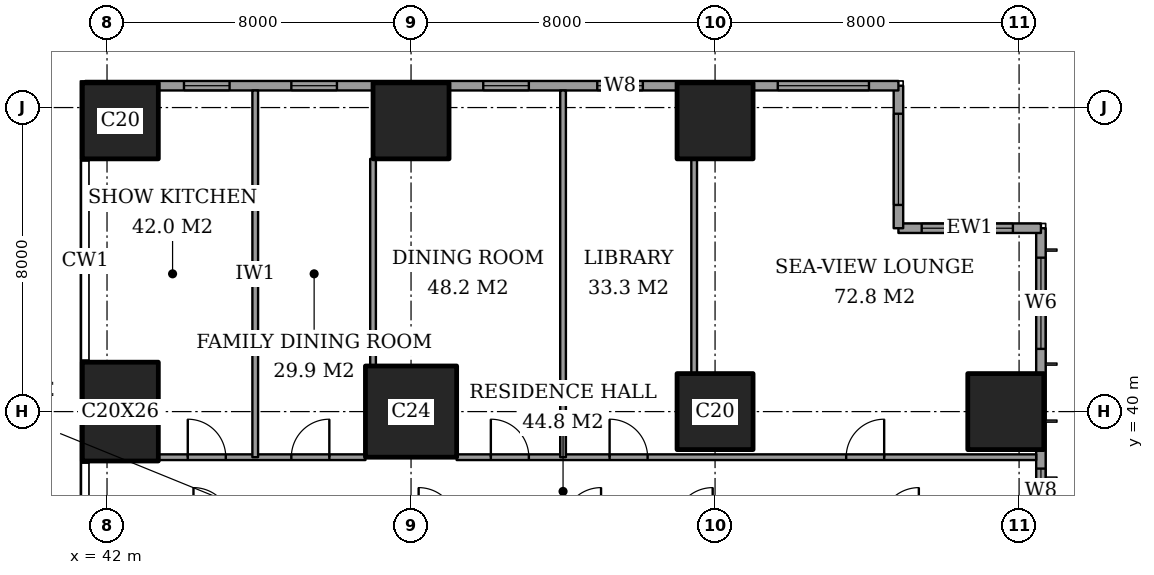
"""IFC4 building model, lengths in metres.
Left out: names, types, materials, properties, quantities, classifications, styles, units other than length and angle.
Written with IfcOpenShell. Run it as: python <this file> out.ifc"""

import sys

from ifc_helpers import new_model, si_unit, direction, frame, frame_2d, origin, origin_2d, place, context, subcontext, project, spatial, rectangle, extrude, element, fill, save


model = new_model("IFC4")
c1 = context("Model", 3, precision=1e-05, world=origin(), true_north=direction((0.0, 1.0)))
c2 = subcontext(c1, "Body", "Model", "MODEL_VIEW")
j1 = project(units=[si_unit("LENGTHUNIT", "METRE"), si_unit("PLANEANGLEUNIT", "RADIAN")], contexts=[c1])
p1 = place(None, origin())
s1 = spatial("IfcSite", under=j1, at=p1, CompositionType="ELEMENT")
p2 = place(p1, origin())
s2 = spatial("IfcBuilding", under=s1, at=p2, CompositionType="ELEMENT")
p3 = place(p2, frame((0.0, 0.0, 47.6)))
s3 = spatial("IfcBuildingStorey", under=s2, at=p3, CompositionType="ELEMENT", Elevation=47.6)
p4 = place(p3, frame((42.35, 40.0, 0.0), z_axis=(0.0, 0.0, 1.0), x_axis=(1.0, 0.0, 0.0)))
e1 = element("IfcColumn", 1, at=p4, inside=s3, PredefinedType="COLUMN", context=c2, shape_type="SweptSolid", body=[
    extrude(rectangle(XDim=2.0, YDim=2.6, at=origin_2d()), origin(), (0.0, 0.0, 1.0), 3.6),
])
p5 = place(p3, frame((42.35, 47.65, 0.0), z_axis=(0.0, 0.0, 1.0), x_axis=(1.0, 0.0, 0.0)))
e2 = element("IfcColumn", 2, at=p5, inside=s3, PredefinedType="COLUMN", context=c2, shape_type="SweptSolid", body=[
    extrude(rectangle(XDim=2.0, YDim=2.0, at=origin_2d()), origin(), (0.0, 0.0, 1.0), 3.6),
])
p6 = place(p3, frame((50.0, 40.0, 0.0), z_axis=(0.0, 0.0, 1.0), x_axis=(1.0, 0.0, 0.0)))
e3 = element("IfcColumn", 3, at=p6, inside=s3, PredefinedType="COLUMN", context=c2, shape_type="SweptSolid", body=[
    extrude(rectangle(XDim=2.4, YDim=2.4, at=origin_2d()), origin(), (0.0, 0.0, 1.0), 3.6),
])
for number, where, z_axis, x_axis in (
    (4, (50.0, 47.65, 0.0), (0.0, 0.0, 1.0), (1.0, 0.0, 0.0)),
    (5, (58.0, 40.0, 0.0), (0.0, 0.0, 1.0), (1.0, 0.0, 0.0)),
    (6, (58.0, 47.65, 0.0), (0.0, 0.0, 1.0), (1.0, 0.0, 0.0)),
    (7, (65.65, 40.0, 0.0), (0.0, 0.0, 1.0), (1.0, 0.0, 0.0)),
):
    element("IfcColumn", number, at=place(p3, frame(where, z_axis=z_axis, x_axis=x_axis)), inside=s3, PredefinedType="COLUMN", context=c2, shape_type="SweptSolid", body=[
        extrude(rectangle(XDim=2.0, YDim=2.0, at=origin_2d()), origin(), (0.0, 0.0, 1.0), 3.6),
    ])
p7 = place(p3, frame((66.575, 3.175, 0.0), z_axis=(0.0, 0.0, 1.0), x_axis=(0.0, 1.0, 0.0)))
e8 = element("IfcWall", 8, at=p7, inside=s3, PredefinedType="SOLIDWALL", context=c2, shape_type="SweptSolid", body=[
    extrude(rectangle(XDim=41.65, YDim=0.25, at=frame_2d((20.825, 0.0))), origin(), (0.0, 0.0, 1.0), 3.6),
])
p8 = place(p7, frame((0.775, 0.0, 0.6)))
e9 = element("IfcOpeningElement", 9, at=p8, cuts=e8, PredefinedType="OPENING", context=c2, shape_type="SweptSolid", body=[
    extrude(rectangle(XDim=2.4, YDim=2.0, at=frame_2d((1.2, 1.0))), frame((0.0, 0.135, 0.0), z_axis=(0.0, -1.0, 0.0), x_axis=(1.0, 0.0, 0.0)), (0.0, 0.0, 1.0), 0.27),
])
p9 = place(p7, frame((6.125, 0.0, 0.6)))
e10 = element("IfcOpeningElement", 10, at=p9, cuts=e8, PredefinedType="OPENING", context=c2, shape_type="SweptSolid", body=[
    extrude(rectangle(XDim=1.2, YDim=2.0, at=frame_2d((0.6, 1.0))), frame((0.0, 0.135, 0.0), z_axis=(0.0, -1.0, 0.0), x_axis=(1.0, 0.0, 0.0)), (0.0, 0.0, 1.0), 0.27),
])
p10 = place(p7, frame((8.375, 0.0, 0.6)))
e11 = element("IfcOpeningElement", 11, at=p10, cuts=e8, PredefinedType="OPENING", context=c2, shape_type="SweptSolid", body=[
    extrude(rectangle(XDim=2.4, YDim=2.0, at=frame_2d((1.2, 1.0))), frame((0.0, 0.135, 0.0), z_axis=(0.0, -1.0, 0.0), x_axis=(1.0, 0.0, 0.0)), (0.0, 0.0, 1.0), 0.27),
])
p11 = place(p7, frame((15.775, 0.0, 0.6)))
e12 = element("IfcOpeningElement", 12, at=p11, cuts=e8, PredefinedType="OPENING", context=c2, shape_type="SweptSolid", body=[
    extrude(rectangle(XDim=2.4, YDim=2.0, at=frame_2d((1.2, 1.0))), frame((0.0, 0.135, 0.0), z_axis=(0.0, -1.0, 0.0), x_axis=(1.0, 0.0, 0.0)), (0.0, 0.0, 1.0), 0.27),
])
p12 = place(p7, frame((23.475, 0.0, 0.6)))
e13 = element("IfcOpeningElement", 13, at=p12, cuts=e8, PredefinedType="OPENING", context=c2, shape_type="SweptSolid", body=[
    extrude(rectangle(XDim=2.4, YDim=2.0, at=frame_2d((1.2, 1.0))), frame((0.0, 0.135, 0.0), z_axis=(0.0, -1.0, 0.0), x_axis=(1.0, 0.0, 0.0)), (0.0, 0.0, 1.0), 0.27),
])
p13 = place(p7, frame((30.775, 0.0, 0.6)))
e14 = element("IfcOpeningElement", 14, at=p13, cuts=e8, PredefinedType="OPENING", context=c2, shape_type="SweptSolid", body=[
    extrude(rectangle(XDim=2.4, YDim=2.0, at=frame_2d((1.2, 1.0))), frame((0.0, 0.135, 0.0), z_axis=(0.0, -1.0, 0.0), x_axis=(1.0, 0.0, 0.0)), (0.0, 0.0, 1.0), 0.27),
])
p14 = place(p7, frame((34.125, 0.0, 0.6)))
e15 = element("IfcOpeningElement", 15, at=p14, cuts=e8, PredefinedType="OPENING", context=c2, shape_type="SweptSolid", body=[
    extrude(rectangle(XDim=1.2, YDim=2.0, at=frame_2d((0.6, 1.0))), frame((0.0, 0.135, 0.0), z_axis=(0.0, -1.0, 0.0), x_axis=(1.0, 0.0, 0.0)), (0.0, 0.0, 1.0), 0.27),
])
p15 = place(p7, frame((38.475, 0.0, 0.6)))
e16 = element("IfcOpeningElement", 16, at=p15, cuts=e8, PredefinedType="OPENING", context=c2, shape_type="SweptSolid", body=[
    extrude(rectangle(XDim=2.4, YDim=2.0, at=frame_2d((1.2, 1.0))), frame((0.0, 0.135, 0.0), z_axis=(0.0, -1.0, 0.0), x_axis=(1.0, 0.0, 0.0)), (0.0, 0.0, 1.0), 0.27),
])
p16 = place(p3, frame((66.575, 44.825, 0.0), z_axis=(0.0, 0.0, 1.0), x_axis=(-1.0, 0.0, 0.0)))
e17 = element("IfcWall", 17, at=p16, inside=s3, PredefinedType="SOLIDWALL", context=c2, shape_type="SweptSolid", body=[
    extrude(rectangle(XDim=3.75, YDim=0.25, at=frame_2d((1.875, 0.0))), origin(), (0.0, 0.0, 1.0), 3.6),
])
p17 = place(p16, frame((0.738, 0.0, 0.6)))
e18 = element("IfcOpeningElement", 18, at=p17, cuts=e17, PredefinedType="OPENING", context=c2, shape_type="SweptSolid", body=[
    extrude(rectangle(XDim=2.4, YDim=2.0, at=frame_2d((1.2, 1.0))), frame((0.0, 0.135, 0.0), z_axis=(0.0, -1.0, 0.0), x_axis=(1.0, 0.0, 0.0)), (0.0, 0.0, 1.0), 0.27),
])
p18 = place(p3, frame((62.825, 44.825, 0.0), z_axis=(0.0, 0.0, 1.0), x_axis=(0.0, 1.0, 0.0)))
e19 = element("IfcWall", 19, at=p18, inside=s3, PredefinedType="SOLIDWALL", context=c2, shape_type="SweptSolid", body=[
    extrude(rectangle(XDim=3.75, YDim=0.25, at=frame_2d((1.875, 0.0))), origin(), (0.0, 0.0, 1.0), 3.6),
])
p19 = place(p18, frame((0.613, 0.0, 0.6)))
e20 = element("IfcOpeningElement", 20, at=p19, cuts=e19, PredefinedType="OPENING", context=c2, shape_type="SweptSolid", body=[
    extrude(rectangle(XDim=2.4, YDim=2.0, at=frame_2d((1.2, 1.0))), frame((0.0, 0.135, 0.0), z_axis=(0.0, -1.0, 0.0), x_axis=(1.0, 0.0, 0.0)), (0.0, 0.0, 1.0), 0.27),
])
p20 = place(p3, frame((62.825, 48.575, 0.0), z_axis=(0.0, 0.0, 1.0), x_axis=(-1.0, 0.0, 0.0)))
e21 = element("IfcWall", 21, at=p20, inside=s3, PredefinedType="SOLIDWALL", context=c2, shape_type="SweptSolid", body=[
    extrude(rectangle(XDim=21.4, YDim=0.25, at=frame_2d((10.7, 0.0))), origin(), (0.0, 0.0, 1.0), 3.6),
])
p21 = place(p20, frame((0.775, 0.0, 0.6)))
e22 = element("IfcOpeningElement", 22, at=p21, cuts=e21, PredefinedType="OPENING", context=c2, shape_type="SweptSolid", body=[
    extrude(rectangle(XDim=2.4, YDim=2.0, at=frame_2d((1.2, 1.0))), frame((0.0, 0.135, 0.0), z_axis=(0.0, -1.0, 0.0), x_axis=(1.0, 0.0, 0.0)), (0.0, 0.0, 1.0), 0.27),
])
p22 = place(p20, frame((6.725, 0.0, 0.6)))
e23 = element("IfcOpeningElement", 23, at=p22, cuts=e21, PredefinedType="OPENING", context=c2, shape_type="SweptSolid", body=[
    extrude(rectangle(XDim=1.2, YDim=2.0, at=frame_2d((0.6, 1.0))), frame((0.0, 0.135, 0.0), z_axis=(0.0, -1.0, 0.0), x_axis=(1.0, 0.0, 0.0)), (0.0, 0.0, 1.0), 0.27),
])
p23 = place(p20, frame((9.725, 0.0, 0.6)))
e24 = element("IfcOpeningElement", 24, at=p23, cuts=e21, PredefinedType="OPENING", context=c2, shape_type="SweptSolid", body=[
    extrude(rectangle(XDim=1.2, YDim=2.0, at=frame_2d((0.6, 1.0))), frame((0.0, 0.135, 0.0), z_axis=(0.0, -1.0, 0.0), x_axis=(1.0, 0.0, 0.0)), (0.0, 0.0, 1.0), 0.27),
])
p24 = place(p20, frame((14.775, 0.0, 0.6)))
e25 = element("IfcOpeningElement", 25, at=p24, cuts=e21, PredefinedType="OPENING", context=c2, shape_type="SweptSolid", body=[
    extrude(rectangle(XDim=1.2, YDim=2.0, at=frame_2d((0.6, 1.0))), frame((0.0, 0.135, 0.0), z_axis=(0.0, -1.0, 0.0), x_axis=(1.0, 0.0, 0.0)), (0.0, 0.0, 1.0), 0.27),
])
p25 = place(p20, frame((17.6, 0.0, 0.6)))
e26 = element("IfcOpeningElement", 26, at=p25, cuts=e21, PredefinedType="OPENING", context=c2, shape_type="SweptSolid", body=[
    extrude(rectangle(XDim=1.2, YDim=2.0, at=frame_2d((0.6, 1.0))), frame((0.0, 0.135, 0.0), z_axis=(0.0, -1.0, 0.0), x_axis=(1.0, 0.0, 0.0)), (0.0, 0.0, 1.0), 0.27),
])
p26 = place(p3, frame((43.35, 38.8, 0.0), z_axis=(0.0, 0.0, 1.0), x_axis=(1.0, 0.0, 0.0)))
e27 = element("IfcWall", 27, at=p26, inside=s3, PredefinedType="PARTITIONING", context=c2, shape_type="SweptSolid", body=[
    extrude(rectangle(XDim=5.45, YDim=0.15, at=frame_2d((2.725, 0.0))), origin(), (0.0, 0.0, 1.0), 3.35),
])
p27 = place(p26, frame((3.5, 0.0, 0.0)))
e28 = element("IfcOpeningElement", 28, at=p27, cuts=e27, PredefinedType="OPENING", context=c2, shape_type="SweptSolid", body=[
    extrude(rectangle(XDim=1.0, YDim=2.1, at=frame_2d((0.5, 1.05))), frame((0.0, 0.085, 0.0), z_axis=(0.0, -1.0, 0.0), x_axis=(1.0, 0.0, 0.0)), (0.0, 0.0, 1.0), 0.17),
])
p28 = place(p26, frame((0.775, 0.0, 0.0)))
e29 = element("IfcOpeningElement", 29, at=p28, cuts=e27, PredefinedType="OPENING", context=c2, shape_type="SweptSolid", body=[
    extrude(rectangle(XDim=1.0, YDim=2.1, at=frame_2d((0.5, 1.05))), frame((0.0, 0.085, 0.0), z_axis=(0.0, -1.0, 0.0), x_axis=(1.0, 0.0, 0.0)), (0.0, 0.0, 1.0), 0.17),
])
p29 = place(p3, frame((51.2, 38.8, 0.0), z_axis=(0.0, 0.0, 1.0), x_axis=(1.0, 0.0, 0.0)))
e30 = element("IfcWall", 30, at=p29, inside=s3, PredefinedType="PARTITIONING", context=c2, shape_type="SweptSolid", body=[
    extrude(rectangle(XDim=15.25, YDim=0.15, at=frame_2d((7.625, 0.0))), origin(), (0.0, 0.0, 1.0), 3.35),
])
p30 = place(p29, frame((10.25, 0.0, 0.0)))
e31 = element("IfcOpeningElement", 31, at=p30, cuts=e30, PredefinedType="OPENING", context=c2, shape_type="SweptSolid", body=[
    extrude(rectangle(XDim=1.0, YDim=2.1, at=frame_2d((0.5, 1.05))), frame((0.0, 0.085, 0.0), z_axis=(0.0, -1.0, 0.0), x_axis=(1.0, 0.0, 0.0)), (0.0, 0.0, 1.0), 0.17),
])
p31 = place(p29, frame((4.025, 0.0, 0.0)))
e32 = element("IfcOpeningElement", 32, at=p31, cuts=e30, PredefinedType="OPENING", context=c2, shape_type="SweptSolid", body=[
    extrude(rectangle(XDim=1.0, YDim=2.1, at=frame_2d((0.5, 1.05))), frame((0.0, 0.085, 0.0), z_axis=(0.0, -1.0, 0.0), x_axis=(1.0, 0.0, 0.0)), (0.0, 0.0, 1.0), 0.17),
])
p32 = place(p29, frame((0.9, 0.0, 0.0)))
e33 = element("IfcOpeningElement", 33, at=p32, cuts=e30, PredefinedType="OPENING", context=c2, shape_type="SweptSolid", body=[
    extrude(rectangle(XDim=1.0, YDim=2.1, at=frame_2d((0.5, 1.05))), frame((0.0, 0.085, 0.0), z_axis=(0.0, -1.0, 0.0), x_axis=(1.0, 0.0, 0.0)), (0.0, 0.0, 1.0), 0.17),
])
p33 = place(p3, frame((45.9, 38.8, 0.0), z_axis=(0.0, 0.0, 1.0), x_axis=(0.0, 1.0, 0.0)))
e34 = element("IfcWall", 34, at=p33, inside=s3, PredefinedType="PARTITIONING", context=c2, shape_type="SweptSolid", body=[
    extrude(rectangle(XDim=9.65, YDim=0.15, at=frame_2d((4.825, 0.0))), origin(), (0.0, 0.0, 1.0), 3.35),
])
p34 = place(p3, frame((49.0, 41.2, 0.0), z_axis=(0.0, 0.0, 1.0), x_axis=(0.0, 1.0, 0.0)))
e35 = element("IfcWall", 35, at=p34, inside=s3, PredefinedType="PARTITIONING", context=c2, shape_type="SweptSolid", body=[
    extrude(rectangle(XDim=5.45, YDim=0.15, at=frame_2d((2.725, 0.0))), origin(), (0.0, 0.0, 1.0), 3.35),
])
p35 = place(p3, frame((54.0, 38.8, 0.0), z_axis=(0.0, 0.0, 1.0), x_axis=(0.0, 1.0, 0.0)))
e36 = element("IfcWall", 36, at=p35, inside=s3, PredefinedType="PARTITIONING", context=c2, shape_type="SweptSolid", body=[
    extrude(rectangle(XDim=9.65, YDim=0.15, at=frame_2d((4.825, 0.0))), origin(), (0.0, 0.0, 1.0), 3.35),
])
p36 = place(p3, frame((57.45, 41.0, 0.0), z_axis=(0.0, 0.0, 1.0), x_axis=(0.0, 1.0, 0.0)))
e37 = element("IfcWall", 37, at=p36, inside=s3, PredefinedType="PARTITIONING", context=c2, shape_type="SweptSolid", body=[
    extrude(rectangle(XDim=5.65, YDim=0.15, at=frame_2d((2.825, 0.0))), origin(), (0.0, 0.0, 1.0), 3.35),
])
p37 = place(p14, origin())
e38 = element("IfcWindow", 38, at=p37, inside=s3, PartitioningType="SINGLE_PANEL", PredefinedType="WINDOW", context=c2, shape_type="SweptSolid", body=[
    extrude(rectangle(XDim=1.2, YDim=2.0, at=frame_2d((0.6, 1.0))), frame((0.0, 0.03, 0.0), z_axis=(0.0, -1.0, 0.0), x_axis=(1.0, 0.0, 0.0)), (0.0, 0.0, 1.0), 0.06),
])
fill(e15, e38)
p38 = place(p15, origin())
e39 = element("IfcWindow", 39, at=p38, inside=s3, PartitioningType="SINGLE_PANEL", PredefinedType="WINDOW", context=c2, shape_type="SweptSolid", body=[
    extrude(rectangle(XDim=2.4, YDim=2.0, at=frame_2d((1.2, 1.0))), frame((0.0, 0.03, 0.0), z_axis=(0.0, -1.0, 0.0), x_axis=(1.0, 0.0, 0.0)), (0.0, 0.0, 1.0), 0.06),
])
fill(e16, e39)
p39 = place(p17, origin())
e40 = element("IfcWindow", 40, at=p39, inside=s3, PartitioningType="SINGLE_PANEL", PredefinedType="WINDOW", context=c2, shape_type="SweptSolid", body=[
    extrude(rectangle(XDim=2.4, YDim=2.0, at=frame_2d((1.2, 1.0))), frame((0.0, 0.03, 0.0), z_axis=(0.0, -1.0, 0.0), x_axis=(1.0, 0.0, 0.0)), (0.0, 0.0, 1.0), 0.06),
])
fill(e18, e40)
p40 = place(p19, origin())
e41 = element("IfcWindow", 41, at=p40, inside=s3, PartitioningType="SINGLE_PANEL", PredefinedType="WINDOW", context=c2, shape_type="SweptSolid", body=[
    extrude(rectangle(XDim=2.4, YDim=2.0, at=frame_2d((1.2, 1.0))), frame((0.0, 0.03, 0.0), z_axis=(0.0, -1.0, 0.0), x_axis=(1.0, 0.0, 0.0)), (0.0, 0.0, 1.0), 0.06),
])
fill(e20, e41)
p41 = place(p21, origin())
e42 = element("IfcWindow", 42, at=p41, inside=s3, PartitioningType="SINGLE_PANEL", PredefinedType="WINDOW", context=c2, shape_type="SweptSolid", body=[
    extrude(rectangle(XDim=2.4, YDim=2.0, at=frame_2d((1.2, 1.0))), frame((0.0, 0.03, 0.0), z_axis=(0.0, -1.0, 0.0), x_axis=(1.0, 0.0, 0.0)), (0.0, 0.0, 1.0), 0.06),
])
fill(e22, e42)
p42 = place(p22, origin())
e43 = element("IfcWindow", 43, at=p42, inside=s3, PartitioningType="SINGLE_PANEL", PredefinedType="WINDOW", context=c2, shape_type="SweptSolid", body=[
    extrude(rectangle(XDim=1.2, YDim=2.0, at=frame_2d((0.6, 1.0))), frame((0.0, 0.03, 0.0), z_axis=(0.0, -1.0, 0.0), x_axis=(1.0, 0.0, 0.0)), (0.0, 0.0, 1.0), 0.06),
])
fill(e23, e43)
p43 = place(p23, origin())
e44 = element("IfcWindow", 44, at=p43, inside=s3, PartitioningType="SINGLE_PANEL", PredefinedType="WINDOW", context=c2, shape_type="SweptSolid", body=[
    extrude(rectangle(XDim=1.2, YDim=2.0, at=frame_2d((0.6, 1.0))), frame((0.0, 0.03, 0.0), z_axis=(0.0, -1.0, 0.0), x_axis=(1.0, 0.0, 0.0)), (0.0, 0.0, 1.0), 0.06),
])
fill(e24, e44)
p44 = place(p24, origin())
e45 = element("IfcWindow", 45, at=p44, inside=s3, PartitioningType="SINGLE_PANEL", PredefinedType="WINDOW", context=c2, shape_type="SweptSolid", body=[
    extrude(rectangle(XDim=1.2, YDim=2.0, at=frame_2d((0.6, 1.0))), frame((0.0, 0.03, 0.0), z_axis=(0.0, -1.0, 0.0), x_axis=(1.0, 0.0, 0.0)), (0.0, 0.0, 1.0), 0.06),
])
fill(e25, e45)
p45 = place(p25, origin())
e46 = element("IfcWindow", 46, at=p45, inside=s3, PartitioningType="SINGLE_PANEL", PredefinedType="WINDOW", context=c2, shape_type="SweptSolid", body=[
    extrude(rectangle(XDim=1.2, YDim=2.0, at=frame_2d((0.6, 1.0))), frame((0.0, 0.03, 0.0), z_axis=(0.0, -1.0, 0.0), x_axis=(1.0, 0.0, 0.0)), (0.0, 0.0, 1.0), 0.06),
])
fill(e26, e46)
p46 = place(p30, origin())
e47 = element("IfcDoor", 47, at=p46, inside=s3, OperationType="SINGLE_SWING_LEFT", PredefinedType="DOOR", context=c2, shape_type="SweptSolid", body=[
    extrude(rectangle(XDim=1.0, YDim=2.1, at=frame_2d((0.5, 1.05))), frame((0.0, 0.025, 0.0), z_axis=(0.0, -1.0, 0.0), x_axis=(1.0, 0.0, 0.0)), (0.0, 0.0, 1.0), 0.05),
])
fill(e31, e47)
p47 = place(p31, origin())
e48 = element("IfcDoor", 48, at=p47, inside=s3, OperationType="SINGLE_SWING_RIGHT", PredefinedType="DOOR", context=c2, shape_type="SweptSolid", body=[
    extrude(rectangle(XDim=1.0, YDim=2.1, at=frame_2d((0.5, 1.05))), frame((0.0, 0.025, 0.0), z_axis=(0.0, -1.0, 0.0), x_axis=(1.0, 0.0, 0.0)), (0.0, 0.0, 1.0), 0.05),
])
fill(e32, e48)
p48 = place(p32, origin())
e49 = element("IfcDoor", 49, at=p48, inside=s3, OperationType="SINGLE_SWING_RIGHT", PredefinedType="DOOR", context=c2, shape_type="SweptSolid", body=[
    extrude(rectangle(XDim=1.0, YDim=2.1, at=frame_2d((0.5, 1.05))), frame((0.0, 0.025, 0.0), z_axis=(0.0, -1.0, 0.0), x_axis=(1.0, 0.0, 0.0)), (0.0, 0.0, 1.0), 0.05),
])
fill(e33, e49)
p49 = place(p27, origin())
e50 = element("IfcDoor", 50, at=p49, inside=s3, OperationType="SINGLE_SWING_LEFT", PredefinedType="DOOR", context=c2, shape_type="SweptSolid", body=[
    extrude(rectangle(XDim=1.0, YDim=2.1, at=frame_2d((0.5, 1.05))), frame((0.0, 0.025, 0.0), z_axis=(0.0, -1.0, 0.0), x_axis=(1.0, 0.0, 0.0)), (0.0, 0.0, 1.0), 0.05),
])
fill(e28, e50)
p50 = place(p28, origin())
e51 = element("IfcDoor", 51, at=p50, inside=s3, OperationType="SINGLE_SWING_RIGHT", PredefinedType="DOOR", context=c2, shape_type="SweptSolid", body=[
    extrude(rectangle(XDim=1.0, YDim=2.1, at=frame_2d((0.5, 1.05))), frame((0.0, 0.025, 0.0), z_axis=(0.0, -1.0, 0.0), x_axis=(1.0, 0.0, 0.0)), (0.0, 0.0, 1.0), 0.05),
])
fill(e29, e51)
save(model, sys.argv[1])
